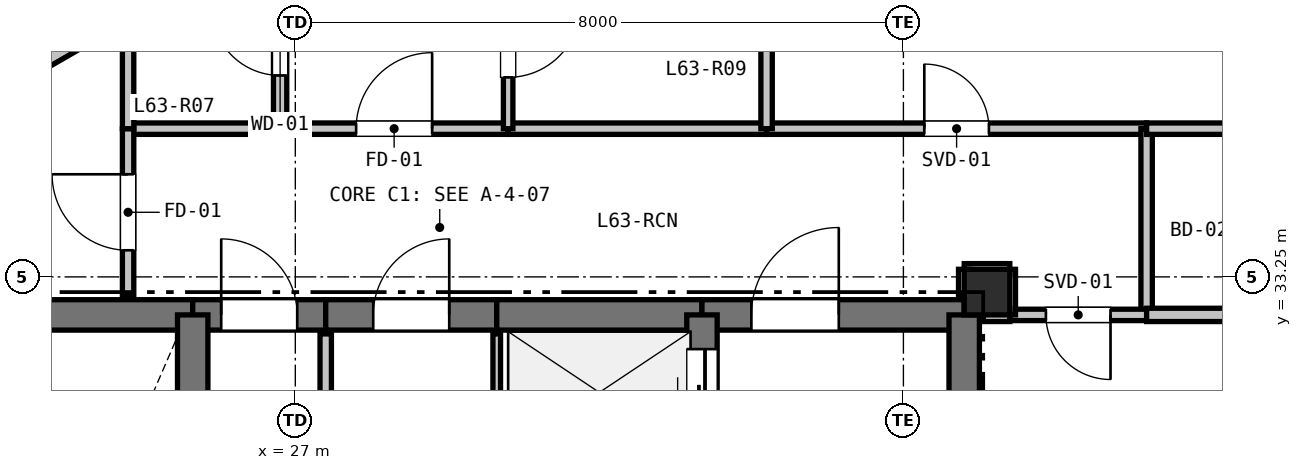
"""IFC4 building model, lengths in metres.
Left out: names, types, materials, properties, quantities, classifications, styles, units other than length and angle.
Written with IfcOpenShell. Run it as: python <this file> out.ifc"""

import sys

from ifc_helpers import new_model, si_unit, direction, frame, frame_2d, origin, origin_2d, place, context, subcontext, project, spatial, rectangle, extrude, element, fill, save


model = new_model("IFC4")
c1 = context("Model", 3, precision=1e-05, world=origin(), true_north=direction((0.0, 1.0)))
c2 = subcontext(c1, "Body", "Model", "MODEL_VIEW")
j1 = project(units=[si_unit("LENGTHUNIT", "METRE"), si_unit("PLANEANGLEUNIT", "RADIAN")], contexts=[c1])
p1 = place(None, origin())
s1 = spatial("IfcSite", under=j1, at=p1, CompositionType="ELEMENT")
p2 = place(p1, origin())
s2 = spatial("IfcBuilding", under=s1, at=p2, CompositionType="ELEMENT")
p3 = place(p2, frame((0.0, 0.0, 226.5)))
s3 = spatial("IfcBuildingStorey", under=s2, at=p3, CompositionType="ELEMENT", Elevation=226.5)
p4 = place(p3, frame((36.1, 33.05, 0.0), z_axis=(0.0, 0.0, 1.0), x_axis=(1.0, 0.0, 0.0)))
e1 = element("IfcColumn", 1, at=p4, inside=s3, PredefinedType="COLUMN", context=c2, shape_type="SweptSolid", body=[
    extrude(rectangle(XDim=0.6, YDim=0.6, at=origin_2d()), origin(), (0.0, 0.0, 1.0), 3.3),
])
p5 = place(p3, frame((20.066, 33.997, 0.0), z_axis=(0.0, 0.0, 1.0), x_axis=(0.866019557082, 0.500010126649, 0.0)))
e2 = element("IfcWall", 2, at=p5, inside=s3, PredefinedType="PARAPET", context=c2, shape_type="SweptSolid", body=[
    extrude(rectangle(XDim=8.228, YDim=0.2, at=frame_2d((4.114, 0.0))), origin(), (0.0, 0.0, 1.0), 0.2),
])
p6 = place(p3, frame((22.2, 32.75, 0.0), z_axis=(0.0, 0.0, 1.0), x_axis=(1.0, 0.0, 0.0)))
e3 = element("IfcWall", 3, at=p6, inside=s3, PredefinedType="SHEAR", context=c2, shape_type="SweptSolid", body=[
    extrude(rectangle(XDim=3.45, YDim=0.4, at=frame_2d((1.725, 0.0))), origin(), (0.0, 0.0, 1.0), 3.08),
])
p7 = place(p3, frame((25.65, 32.75, 0.0), z_axis=(0.0, 0.0, 1.0), x_axis=(1.0, 0.0, 0.0)))
e4 = element("IfcWall", 4, at=p7, inside=s3, PredefinedType="SHEAR", context=c2, shape_type="SweptSolid", body=[
    extrude(rectangle(XDim=1.75, YDim=0.4, at=frame_2d((0.875, 0.0))), origin(), (0.0, 0.0, 1.0), 3.08),
])
p8 = place(p7, frame((0.375, 0.0, 0.0)))
e5 = element("IfcOpeningElement", 5, at=p8, cuts=e4, PredefinedType="OPENING", context=c2, shape_type="SweptSolid", body=[
    extrude(rectangle(XDim=1.0, YDim=2.15, at=frame_2d((0.5, 1.075))), frame((0.0, 0.21, 0.0), z_axis=(0.0, -1.0, 0.0), x_axis=(1.0, 0.0, 0.0)), (0.0, 0.0, 1.0), 0.42),
])
p9 = place(p3, frame((27.4, 32.75, 0.0), z_axis=(0.0, 0.0, 1.0), x_axis=(1.0, 0.0, 0.0)))
e6 = element("IfcWall", 6, at=p9, inside=s3, PredefinedType="SHEAR", context=c2, shape_type="SweptSolid", body=[
    extrude(rectangle(XDim=2.25, YDim=0.4, at=frame_2d((1.125, 0.0))), origin(), (0.0, 0.0, 1.0), 3.08),
])
p10 = place(p9, frame((0.625, 0.0, 0.0)))
e7 = element("IfcOpeningElement", 7, at=p10, cuts=e6, PredefinedType="OPENING", context=c2, shape_type="SweptSolid", body=[
    extrude(rectangle(XDim=1.0, YDim=2.15, at=frame_2d((0.5, 1.075))), frame((0.0, 0.21, 0.0), z_axis=(0.0, -1.0, 0.0), x_axis=(1.0, 0.0, 0.0)), (0.0, 0.0, 1.0), 0.42),
])
p11 = place(p3, frame((29.65, 32.75, 0.0), z_axis=(0.0, 0.0, 1.0), x_axis=(1.0, 0.0, 0.0)))
e8 = element("IfcWall", 8, at=p11, inside=s3, PredefinedType="SHEAR", context=c2, shape_type="SweptSolid", body=[
    extrude(rectangle(XDim=2.7, YDim=0.4, at=frame_2d((1.35, 0.0))), origin(), (0.0, 0.0, 1.0), 3.08),
])
p12 = place(p3, frame((32.35, 32.75, 0.0), z_axis=(0.0, 0.0, 1.0), x_axis=(1.0, 0.0, 0.0)))
e9 = element("IfcWall", 9, at=p12, inside=s3, PredefinedType="SHEAR", context=c2, shape_type="SweptSolid", body=[
    extrude(rectangle(XDim=3.45, YDim=0.4, at=frame_2d((1.725, 0.0))), origin(), (0.0, 0.0, 1.0), 3.08),
])
p13 = place(p12, frame((0.65, 0.0, 0.0)))
e10 = element("IfcOpeningElement", 10, at=p13, cuts=e9, PredefinedType="OPENING", context=c2, shape_type="SweptSolid", body=[
    extrude(rectangle(XDim=1.15, YDim=2.15, at=frame_2d((0.575, 1.075))), frame((0.0, 0.21, 0.0), z_axis=(0.0, -1.0, 0.0), x_axis=(1.0, 0.0, 0.0)), (0.0, 0.0, 1.0), 0.42),
])
p14 = place(p3, frame((35.8, 32.75, 0.0), z_axis=(0.0, 0.0, 1.0), x_axis=(0.0, -1.0, 0.0)))
e11 = element("IfcWall", 11, at=p14, inside=s3, PredefinedType="SHEAR", context=c2, shape_type="SweptSolid", body=[
    extrude(rectangle(XDim=4.65, YDim=0.4, at=frame_2d((2.325, 0.0))), origin(), (0.0, 0.0, 1.0), 3.08),
])
p15 = place(p3, frame((25.65, 27.95, 0.0), z_axis=(0.0, 0.0, 1.0), x_axis=(0.0, 1.0, 0.0)))
e12 = element("IfcWall", 12, at=p15, inside=s3, PredefinedType="SHEAR", context=c2, shape_type="SweptSolid", body=[
    extrude(rectangle(XDim=4.8, YDim=0.4, at=frame_2d((2.4, 0.0))), origin(), (0.0, 0.0, 1.0), 3.08),
])
p16 = place(p3, frame((32.35, 30.75, 0.0), z_axis=(0.0, 0.0, 1.0), x_axis=(0.0, 1.0, 0.0)))
e13 = element("IfcWall", 13, at=p16, inside=s3, PredefinedType="SHEAR", context=c2, shape_type="SweptSolid", body=[
    extrude(rectangle(XDim=2.0, YDim=0.4, at=frame_2d((1.0, 0.0))), origin(), (0.0, 0.0, 1.0), 3.08),
])
p17 = place(p16, frame((0.45, 0.0, 0.0)))
e14 = element("IfcOpeningElement", 14, at=p17, cuts=e13, PredefinedType="OPENING", context=c2, shape_type="SweptSolid", body=[
    extrude(rectangle(XDim=1.1, YDim=2.15, at=frame_2d((0.55, 1.075))), frame((0.0, 0.21, 0.0), z_axis=(0.0, -1.0, 0.0), x_axis=(1.0, 0.0, 0.0)), (0.0, 0.0, 1.0), 0.42),
])
p18 = place(p3, frame((29.65, 30.3, 0.0), z_axis=(0.0, 0.0, 1.0), x_axis=(0.0, 1.0, 0.0)))
e15 = element("IfcWall", 15, at=p18, inside=s3, PredefinedType="PARTITIONING", context=c2, shape_type="SweptSolid", body=[
    extrude(rectangle(XDim=2.2, YDim=0.1, at=frame_2d((1.1, 0.0))), origin(), (0.0, 0.0, 1.0), 3.08),
])
p19 = place(p3, frame((27.4, 32.5, 0.0), z_axis=(0.0, 0.0, 1.0), x_axis=(0.0, -1.0, 0.0)))
e16 = element("IfcWall", 16, at=p19, inside=s3, PredefinedType="PARTITIONING", context=c2, shape_type="SweptSolid", body=[
    extrude(rectangle(XDim=4.55, YDim=0.15, at=frame_2d((2.275, 0.0))), origin(), (0.0, 0.0, 1.0), 3.08),
])
p20 = place(p19, frame((1.775, 0.0, 0.0)))
e17 = element("IfcOpeningElement", 17, at=p20, cuts=e16, PredefinedType="OPENING", context=c2, shape_type="SweptSolid", body=[
    extrude(rectangle(XDim=1.0, YDim=2.15, at=frame_2d((0.5, 1.075))), frame((0.0, 0.085, 0.0), z_axis=(0.0, -1.0, 0.0), x_axis=(1.0, 0.0, 0.0)), (0.0, 0.0, 1.0), 0.17),
])
p21 = place(p3, frame((24.8, 35.2, 0.0), z_axis=(0.0, 0.0, 1.0), x_axis=(1.0, 0.0, 0.0)))
e18 = element("IfcWall", 18, at=p21, inside=s3, PredefinedType="PARTITIONING", context=c2, shape_type="SweptSolid", body=[
    extrude(rectangle(XDim=2.0, YDim=0.15, at=frame_2d((1.0, 0.0))), origin(), (0.0, 0.0, 1.0), 3.08),
])
p22 = place(p3, frame((26.8, 35.2, 0.0), z_axis=(0.0, 0.0, 1.0), x_axis=(1.0, 0.0, 0.0)))
e19 = element("IfcWall", 19, at=p22, inside=s3, PredefinedType="PARTITIONING", context=c2, shape_type="SweptSolid", body=[
    extrude(rectangle(XDim=3.0, YDim=0.15, at=frame_2d((1.5, 0.0))), origin(), (0.0, 0.0, 1.0), 3.08),
])
p23 = place(p22, frame((1.0, 0.0, 0.0)))
e20 = element("IfcOpeningElement", 20, at=p23, cuts=e19, PredefinedType="OPENING", context=c2, shape_type="SweptSolid", body=[
    extrude(rectangle(XDim=1.0, YDim=2.15, at=frame_2d((0.5, 1.075))), frame((0.0, 0.085, 0.0), z_axis=(0.0, -1.0, 0.0), x_axis=(1.0, 0.0, 0.0)), (0.0, 0.0, 1.0), 0.17),
])
p24 = place(p3, frame((29.8, 35.2, 0.0), z_axis=(0.0, 0.0, 1.0), x_axis=(1.0, 0.0, 0.0)))
e21 = element("IfcWall", 21, at=p24, inside=s3, PredefinedType="PARTITIONING", context=c2, shape_type="SweptSolid", body=[
    extrude(rectangle(XDim=3.4, YDim=0.15, at=frame_2d((1.7, 0.0))), origin(), (0.0, 0.0, 1.0), 3.08),
])
p25 = place(p3, frame((33.2, 35.2, 0.0), z_axis=(0.0, 0.0, 1.0), x_axis=(1.0, 0.0, 0.0)))
e22 = element("IfcWall", 22, at=p25, inside=s3, PredefinedType="PARTITIONING", context=c2, shape_type="SweptSolid", body=[
    extrude(rectangle(XDim=5.0, YDim=0.15, at=frame_2d((2.5, 0.0))), origin(), (0.0, 0.0, 1.0), 2.528),
])
p26 = place(p25, frame((2.075, 0.0, 0.0)))
e23 = element("IfcOpeningElement", 23, at=p26, cuts=e22, PredefinedType="OPENING", context=c2, shape_type="SweptSolid", body=[
    extrude(rectangle(XDim=0.85, YDim=2.1, at=frame_2d((0.425, 1.05))), frame((0.0, 0.085, 0.0), z_axis=(0.0, -1.0, 0.0), x_axis=(1.0, 0.0, 0.0)), (0.0, 0.0, 1.0), 0.17),
])
p27 = place(p3, frame((38.2, 35.2, 0.0), z_axis=(0.0, 0.0, 1.0), x_axis=(0.0, -1.0, 0.0)))
e24 = element("IfcWall", 24, at=p27, inside=s3, PredefinedType="PARTITIONING", context=c2, shape_type="SweptSolid", body=[
    extrude(rectangle(XDim=2.45, YDim=0.15, at=frame_2d((1.225, 0.0))), origin(), (0.0, 0.0, 1.0), 3.08),
])
p28 = place(p3, frame((38.2, 32.75, 0.0), z_axis=(0.0, 0.0, 1.0), x_axis=(-1.0, 0.0, 0.0)))
e25 = element("IfcWall", 25, at=p28, inside=s3, PredefinedType="PARTITIONING", context=c2, shape_type="SweptSolid", body=[
    extrude(rectangle(XDim=1.8, YDim=0.15, at=frame_2d((0.9, 0.0))), origin(), (0.0, 0.0, 1.0), 3.08),
])
p29 = place(p28, frame((0.475, 0.0, 0.0)))
e26 = element("IfcOpeningElement", 26, at=p29, cuts=e25, PredefinedType="OPENING", context=c2, shape_type="SweptSolid", body=[
    extrude(rectangle(XDim=0.85, YDim=2.1, at=frame_2d((0.425, 1.05))), frame((0.0, 0.085, 0.0), z_axis=(0.0, -1.0, 0.0), x_axis=(1.0, 0.0, 0.0)), (0.0, 0.0, 1.0), 0.17),
])
p30 = place(p3, frame((36.4, 32.75, 0.0), z_axis=(0.0, 0.0, 1.0), x_axis=(0.0, 1.0, 0.0)))
e27 = element("IfcWall", 27, at=p30, inside=s3, PredefinedType="PARTITIONING", context=c2, shape_type="SweptSolid", body=[
    extrude(rectangle(XDim=0.6, YDim=0.15, at=frame_2d((0.3, 0.0))), origin(), (0.0, 0.0, 1.0), 2.528),
])
p31 = place(p3, frame((36.4, 33.35, 0.0), z_axis=(0.0, 0.0, 1.0), x_axis=(-1.0, 0.0, 0.0)))
e28 = element("IfcWall", 28, at=p31, inside=s3, PredefinedType="PARTITIONING", context=c2, shape_type="SweptSolid", body=[
    extrude(rectangle(XDim=0.6, YDim=0.15, at=frame_2d((0.3, 0.0))), origin(), (0.0, 0.0, 1.0), 2.528),
])
p32 = place(p3, frame((35.8, 33.35, 0.0), z_axis=(0.0, 0.0, 1.0), x_axis=(0.0, -1.0, 0.0)))
e29 = element("IfcWall", 29, at=p32, inside=s3, PredefinedType="PARTITIONING", context=c2, shape_type="SweptSolid", body=[
    extrude(rectangle(XDim=0.35, YDim=0.15, at=frame_2d((0.175, 0.0))), origin(), (0.0, 0.0, 1.0), 2.605),
])
p33 = place(p3, frame((24.8, 33.0, 0.0), z_axis=(0.0, 0.0, 1.0), x_axis=(0.0, 1.0, 0.0)))
e30 = element("IfcWall", 30, at=p33, inside=s3, PredefinedType="PARTITIONING", context=c2, shape_type="SweptSolid", body=[
    extrude(rectangle(XDim=2.2, YDim=0.15, at=frame_2d((1.1, 0.0))), origin(), (0.0, 0.0, 1.0), 2.605),
])
p34 = place(p33, frame((0.6, 0.0, 0.0)))
e31 = element("IfcOpeningElement", 31, at=p34, cuts=e30, PredefinedType="OPENING", context=c2, shape_type="SweptSolid", body=[
    extrude(rectangle(XDim=1.0, YDim=2.15, at=frame_2d((0.5, 1.075))), frame((0.0, 0.085, 0.0), z_axis=(0.0, -1.0, 0.0), x_axis=(1.0, 0.0, 0.0)), (0.0, 0.0, 1.0), 0.17),
])
p35 = place(p3, frame((29.8, 37.5, 0.0), z_axis=(0.0, 0.0, 1.0), x_axis=(0.0, -1.0, 0.0)))
e32 = element("IfcWall", 32, at=p35, inside=s3, PredefinedType="PARTITIONING", context=c2, shape_type="SweptSolid", body=[
    extrude(rectangle(XDim=2.3, YDim=0.125, at=frame_2d((1.15, 0.0))), origin(), (0.0, 0.0, 1.0), 3.08),
])
p36 = place(p35, frame((0.675, 0.0, 0.0)))
e33 = element("IfcOpeningElement", 33, at=p36, cuts=e32, PredefinedType="OPENING", context=c2, shape_type="SweptSolid", body=[
    extrude(rectangle(XDim=0.95, YDim=2.1, at=frame_2d((0.475, 1.05))), frame((0.0, 0.073, 0.0), z_axis=(0.0, -1.0, 0.0), x_axis=(1.0, 0.0, 0.0)), (0.0, 0.0, 1.0), 0.145),
])
p37 = place(p3, frame((26.8, 35.2, 0.0), z_axis=(0.0, 0.0, 1.0), x_axis=(0.0, 1.0, 0.0)))
e34 = element("IfcWall", 34, at=p37, inside=s3, PredefinedType="PLUMBINGWALL", context=c2, shape_type="SweptSolid", body=[
    extrude(rectangle(XDim=2.3, YDim=0.175, at=frame_2d((1.15, 0.0))), origin(), (0.0, 0.0, 1.0), 2.365),
])
p38 = place(p37, frame((0.7, 0.0, 0.0)))
e35 = element("IfcOpeningElement", 35, at=p38, cuts=e34, PredefinedType="OPENING", context=c2, shape_type="SweptSolid", body=[
    extrude(rectangle(XDim=0.9, YDim=2.1, at=frame_2d((0.45, 1.05))), frame((0.0, 0.097, 0.0), z_axis=(0.0, -1.0, 0.0), x_axis=(1.0, 0.0, 0.0)), (0.0, 0.0, 1.0), 0.195),
])
p39 = place(p3, frame((36.05, 32.75, 0.0), z_axis=(0.0, 0.0, 1.0), x_axis=(1.0, 0.0, 0.0)))
e36 = element("IfcWall", 36, at=p39, inside=s3, PredefinedType="PLUMBINGWALL", context=c2, shape_type="SweptSolid", body=[
    extrude(rectangle(XDim=0.35, YDim=0.175, at=frame_2d((0.175, 0.0))), origin(), (0.0, 0.0, 1.0), 2.605),
])
p40 = place(p3, frame((38.2, 32.75, 0.0), z_axis=(0.0, 0.0, 1.0), x_axis=(1.0, 0.0, 0.0)))
e37 = element("IfcWall", 37, at=p40, inside=s3, PredefinedType="PLUMBINGWALL", context=c2, shape_type="SweptSolid", body=[
    extrude(rectangle(XDim=1.406, YDim=0.175, at=frame_2d((0.703, 0.0))), origin(), (0.0, 0.0, 1.0), 2.365),
])
p41 = place(p3, frame((24.8, 35.2, 0.0), z_axis=(0.0, 0.0, 1.0), x_axis=(0.0, 1.0, 0.0)))
e38 = element("IfcWall", 38, at=p41, inside=s3, PredefinedType="PARTITIONING", context=c2, shape_type="SweptSolid", body=[
    extrude(rectangle(XDim=1.484, YDim=0.15, at=frame_2d((0.742, 0.0))), origin(), (0.0, 0.0, 1.0), 2.365),
])
p42 = place(p3, frame((33.2, 37.5, 0.0), z_axis=(0.0, 0.0, 1.0), x_axis=(0.0, -1.0, 0.0)))
e39 = element("IfcWall", 39, at=p42, inside=s3, PredefinedType="PARTITIONING", context=c2, shape_type="SweptSolid", body=[
    extrude(rectangle(XDim=2.3, YDim=0.15, at=frame_2d((1.15, 0.0))), origin(), (0.0, 0.0, 1.0), 3.08),
])
p43 = place(p3, frame((39.606, 35.2, 0.0), z_axis=(0.0, 0.0, 1.0), x_axis=(-1.0, 0.0, 0.0)))
e40 = element("IfcWall", 40, at=p43, inside=s3, PredefinedType="PARTITIONING", context=c2, shape_type="SweptSolid", body=[
    extrude(rectangle(XDim=1.406, YDim=0.15, at=frame_2d((0.703, 0.0))), origin(), (0.0, 0.0, 1.0), 2.365),
])
p44 = place(p8, origin())
e41 = element("IfcDoor", 41, at=p44, inside=s3, OperationType="SINGLE_SWING_LEFT", PredefinedType="DOOR", context=c2, shape_type="SweptSolid", body=[
    extrude(rectangle(XDim=1.0, YDim=2.15, at=frame_2d((0.5, 1.075))), frame((0.0, 0.025, 0.0), z_axis=(0.0, -1.0, 0.0), x_axis=(1.0, 0.0, 0.0)), (0.0, 0.0, 1.0), 0.05),
])
fill(e5, e41)
p45 = place(p17, origin())
e42 = element("IfcDoor", 42, at=p45, inside=s3, OperationType="SLIDING_TO_LEFT", PredefinedType="DOOR", context=c2, shape_type="SweptSolid", body=[
    extrude(rectangle(XDim=1.1, YDim=2.15, at=frame_2d((0.55, 1.075))), frame((0.0, 0.025, 0.0), z_axis=(0.0, -1.0, 0.0), x_axis=(1.0, 0.0, 0.0)), (0.0, 0.0, 1.0), 0.05),
])
fill(e14, e42)
p46 = place(p13, origin())
e43 = element("IfcDoor", 43, at=p46, inside=s3, OperationType="SINGLE_SWING_RIGHT", PredefinedType="DOOR", context=c2, shape_type="SweptSolid", body=[
    extrude(rectangle(XDim=1.15, YDim=2.15, at=frame_2d((0.575, 1.075))), frame((0.0, 0.025, 0.0), z_axis=(0.0, -1.0, 0.0), x_axis=(1.0, 0.0, 0.0)), (0.0, 0.0, 1.0), 0.05),
])
fill(e10, e43)
p47 = place(p23, origin())
e44 = element("IfcDoor", 44, at=p47, inside=s3, OperationType="SINGLE_SWING_RIGHT", PredefinedType="DOOR", context=c2, shape_type="SweptSolid", body=[
    extrude(rectangle(XDim=1.0, YDim=2.15, at=frame_2d((0.5, 1.075))), frame((0.0, 0.025, 0.0), z_axis=(0.0, -1.0, 0.0), x_axis=(1.0, 0.0, 0.0)), (0.0, 0.0, 1.0), 0.05),
])
fill(e20, e44)
p48 = place(p29, origin())
e45 = element("IfcDoor", 45, at=p48, inside=s3, OperationType="SINGLE_SWING_LEFT", PredefinedType="DOOR", context=c2, shape_type="SweptSolid", body=[
    extrude(rectangle(XDim=0.85, YDim=2.1, at=frame_2d((0.425, 1.05))), frame((0.0, 0.025, 0.0), z_axis=(0.0, -1.0, 0.0), x_axis=(1.0, 0.0, 0.0)), (0.0, 0.0, 1.0), 0.05),
])
fill(e26, e45)
p49 = place(p10, origin())
e46 = element("IfcDoor", 46, at=p49, inside=s3, OperationType="SINGLE_SWING_RIGHT", PredefinedType="DOOR", context=c2, shape_type="SweptSolid", body=[
    extrude(rectangle(XDim=1.0, YDim=2.15, at=frame_2d((0.5, 1.075))), frame((0.0, 0.025, 0.0), z_axis=(0.0, -1.0, 0.0), x_axis=(1.0, 0.0, 0.0)), (0.0, 0.0, 1.0), 0.05),
])
fill(e7, e46)
p50 = place(p26, origin())
e47 = element("IfcDoor", 47, at=p50, inside=s3, OperationType="SINGLE_SWING_LEFT", PredefinedType="DOOR", context=c2, shape_type="SweptSolid", body=[
    extrude(rectangle(XDim=0.85, YDim=2.1, at=frame_2d((0.425, 1.05))), frame((0.0, 0.025, 0.0), z_axis=(0.0, -1.0, 0.0), x_axis=(1.0, 0.0, 0.0)), (0.0, 0.0, 1.0), 0.05),
])
fill(e23, e47)
p51 = place(p34, origin())
e48 = element("IfcDoor", 48, at=p51, inside=s3, OperationType="SINGLE_SWING_RIGHT", PredefinedType="DOOR", context=c2, shape_type="SweptSolid", body=[
    extrude(rectangle(XDim=1.0, YDim=2.15, at=frame_2d((0.5, 1.075))), frame((0.0, 0.025, 0.0), z_axis=(0.0, -1.0, 0.0), x_axis=(1.0, 0.0, 0.0)), (0.0, 0.0, 1.0), 0.05),
])
fill(e31, e48)
p52 = place(p38, origin())
e49 = element("IfcDoor", 49, at=p52, inside=s3, OperationType="SINGLE_SWING_RIGHT", PredefinedType="DOOR", context=c2, shape_type="SweptSolid", body=[
    extrude(rectangle(XDim=0.9, YDim=2.1, at=frame_2d((0.45, 1.05))), frame((0.0, 0.025, 0.0), z_axis=(0.0, -1.0, 0.0), x_axis=(1.0, 0.0, 0.0)), (0.0, 0.0, 1.0), 0.05),
])
fill(e35, e49)
p53 = place(p36, origin())
e50 = element("IfcDoor", 50, at=p53, inside=s3, OperationType="SINGLE_SWING_LEFT", PredefinedType="DOOR", context=c2, shape_type="SweptSolid", body=[
    extrude(rectangle(XDim=0.95, YDim=2.1, at=frame_2d((0.475, 1.05))), frame((0.0, 0.025, 0.0), z_axis=(0.0, -1.0, 0.0), x_axis=(1.0, 0.0, 0.0)), (0.0, 0.0, 1.0), 0.05),
])
fill(e33, e50)
save(model, sys.argv[1])
